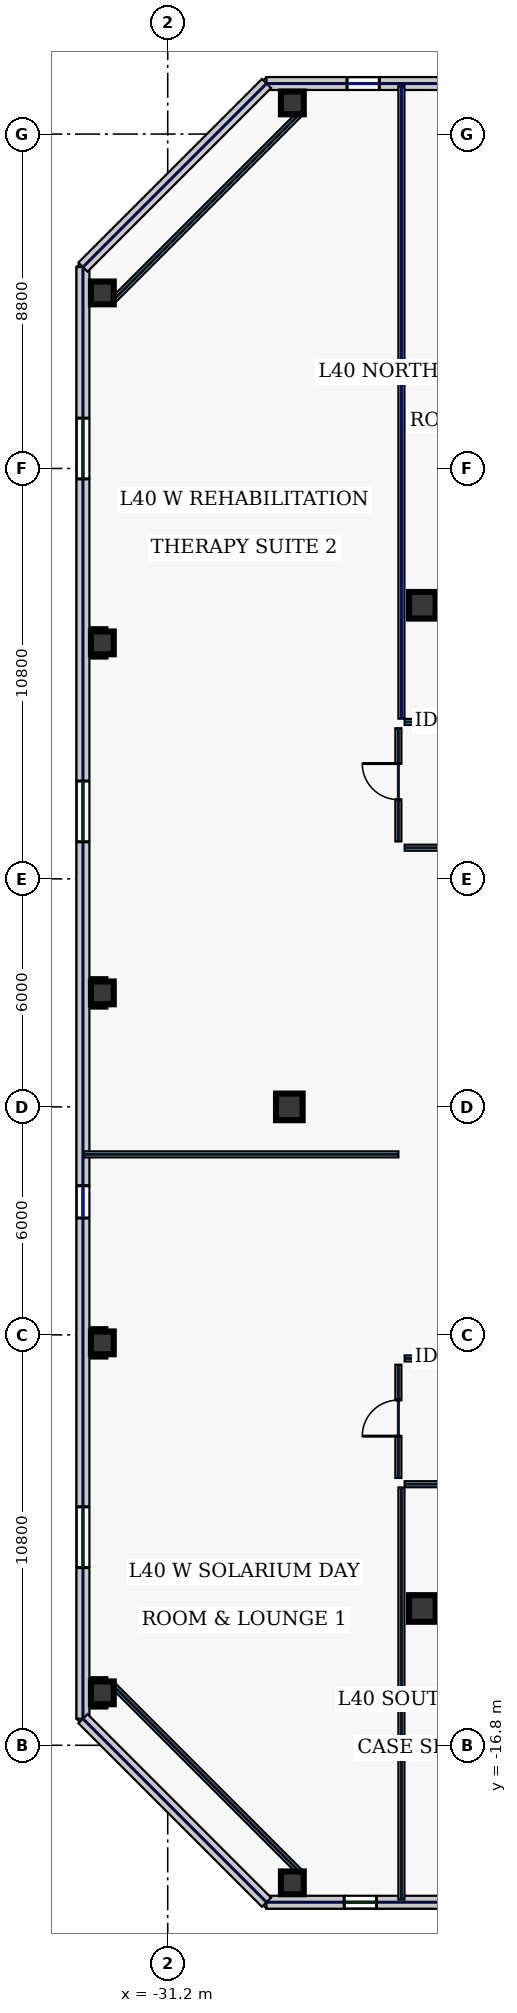
"""IFC4 building model, lengths in metres.
Left out: names, types, materials, properties, quantities, classifications, styles, units other than length and angle.
Written with IfcOpenShell. Run it as: python <this file> out.ifc"""

import sys

from ifc_helpers import new_model, si_unit, direction, frame, frame_2d, origin, origin_2d, place, context, subcontext, project, spatial, rectangle, hollow_rectangle, extrude, element, fill, save


model = new_model("IFC4")
c1 = context("Model", 3, precision=1e-05, world=origin(), true_north=direction((0.0, 1.0)))
c2 = subcontext(c1, "Body", "Model", "MODEL_VIEW")
j1 = project(units=[si_unit("LENGTHUNIT", "METRE"), si_unit("PLANEANGLEUNIT", "RADIAN")], contexts=[c1])
p1 = place(None, origin())
s1 = spatial("IfcSite", under=j1, at=p1, CompositionType="ELEMENT")
p2 = place(p1, origin())
s2 = spatial("IfcBuilding", under=s1, at=p2, CompositionType="ELEMENT")
p3 = place(p2, frame((0.0, 0.0, 176.2)))
s3 = spatial("IfcBuildingStorey", under=s2, at=p3, CompositionType="ELEMENT", Elevation=176.2)
for number, where, z_axis, x_axis in (
    (1, (-24.5, -13.2, 0.0), (0.0, 0.0, 1.0), (1.0, 0.0, 0.0)),
    (2, (-24.5, 13.2, 0.0), (0.0, 0.0, 1.0), (1.0, 0.0, 0.0)),
    (3, (-28.0, 0.0, 0.0), (0.0, 0.0, 1.0), (1.0, 0.0, 0.0)),
):
    element("IfcColumn", number, at=place(p3, frame(where, z_axis=z_axis, x_axis=x_axis)), inside=s3, PredefinedType="COLUMN", context=c2, shape_type="SweptSolid", body=[
        extrude(hollow_rectangle(XDim=0.7, YDim=0.7, WallThickness=0.032, at=origin_2d()), origin(), (0.0, 0.0, 1.0), 3.74),
    ])
for number, where, z_axis, x_axis in (
    (4, (-27.92, -20.42, 0.0), (0.0, 0.0, 1.0), (1.0, 0.0, 0.0)),
    (5, (-27.92, 26.42, 0.0), (0.0, 0.0, 1.0), (1.0, 0.0, 0.0)),
    (6, (-32.92, 21.42, 0.0), (0.0, 0.0, 1.0), (1.0, 0.0, 0.0)),
    (7, (-32.92, 12.21, 0.0), (0.0, 0.0, 1.0), (1.0, 0.0, 0.0)),
    (8, (-32.92, 3.0, 0.0), (0.0, 0.0, 1.0), (1.0, 0.0, 0.0)),
    (9, (-32.92, -6.21, 0.0), (0.0, 0.0, 1.0), (1.0, 0.0, 0.0)),
    (10, (-32.92, -15.42, 0.0), (0.0, 0.0, 1.0), (1.0, 0.0, 0.0)),
):
    element("IfcColumn", number, at=place(p3, frame(where, z_axis=z_axis, x_axis=x_axis)), inside=s3, PredefinedType="COLUMN", context=c2, shape_type="SweptSolid", body=[
        extrude(hollow_rectangle(XDim=0.6, YDim=0.6, WallThickness=0.028, at=origin_2d()), origin(), (0.0, 0.0, 1.0), 3.74),
    ])
p4 = place(p3, frame((-28.6, -20.93, 0.0), z_axis=(0.0, 0.0, 1.0), x_axis=(1.0, 0.0, 0.0)))
e11 = element("IfcWall", 11, at=p4, inside=s3, PredefinedType="STANDARD", context=c2, shape_type="SweptSolid", body=[
    extrude(rectangle(XDim=19.937, YDim=0.34, at=frame_2d((9.969, 0.0))), origin(), (0.0, 0.0, 1.0), 3.74),
])
p5 = place(p4, frame((2.044, 0.0, 0.8)))
e12 = element("IfcOpeningElement", 12, at=p5, cuts=e11, PredefinedType="OPENING", context=c2, shape_type="SweptSolid", body=[
    extrude(rectangle(XDim=0.85, YDim=1.85, at=frame_2d((0.425, 0.925))), frame((0.0, 0.18, 0.0), z_axis=(0.0, -1.0, 0.0), x_axis=(1.0, 0.0, 0.0)), (0.0, 0.0, 1.0), 0.36),
])
p6 = place(p4, frame((6.029, 0.0, 0.8)))
e13 = element("IfcOpeningElement", 13, at=p6, cuts=e11, PredefinedType="OPENING", context=c2, shape_type="SweptSolid", body=[
    extrude(rectangle(XDim=0.85, YDim=1.85, at=frame_2d((0.425, 0.925))), frame((0.0, 0.18, 0.0), z_axis=(0.0, -1.0, 0.0), x_axis=(1.0, 0.0, 0.0)), (0.0, 0.0, 1.0), 0.36),
])
p7 = place(p4, frame((10.707, 0.0, 0.8)))
e14 = element("IfcOpeningElement", 14, at=p7, cuts=e11, PredefinedType="OPENING", context=c2, shape_type="SweptSolid", body=[
    extrude(rectangle(XDim=1.95, YDim=2.1, at=frame_2d((0.975, 1.05))), frame((0.0, 0.18, 0.0), z_axis=(0.0, -1.0, 0.0), x_axis=(1.0, 0.0, 0.0)), (0.0, 0.0, 1.0), 0.36),
])
p8 = place(p4, frame((14.692, 0.0, 0.8)))
e15 = element("IfcOpeningElement", 15, at=p8, cuts=e11, PredefinedType="OPENING", context=c2, shape_type="SweptSolid", body=[
    extrude(rectangle(XDim=1.95, YDim=2.1, at=frame_2d((0.975, 1.05))), frame((0.0, 0.18, 0.0), z_axis=(0.0, -1.0, 0.0), x_axis=(1.0, 0.0, 0.0)), (0.0, 0.0, 1.0), 0.36),
])
p9 = place(p3, frame((-8.663, 26.93, 0.0), z_axis=(0.0, 0.0, 1.0), x_axis=(-1.0, 0.0, 0.0)))
e16 = element("IfcWall", 16, at=p9, inside=s3, PredefinedType="STANDARD", context=c2, shape_type="SweptSolid", body=[
    extrude(rectangle(XDim=19.937, YDim=0.34, at=frame_2d((9.969, 0.0))), origin(), (0.0, 0.0, 1.0), 3.74),
])
p10 = place(p9, frame((16.968, 0.0, 0.7)))
e17 = element("IfcOpeningElement", 17, at=p10, cuts=e16, PredefinedType="OPENING", context=c2, shape_type="SweptSolid", body=[
    extrude(rectangle(XDim=0.85, YDim=1.85, at=frame_2d((0.425, 0.925))), frame((0.0, 0.18, 0.0), z_axis=(0.0, -1.0, 0.0), x_axis=(1.0, 0.0, 0.0)), (0.0, 0.0, 1.0), 0.36),
])
p11 = place(p9, frame((12.033, 0.0, 0.7)))
e18 = element("IfcOpeningElement", 18, at=p11, cuts=e16, PredefinedType="OPENING", context=c2, shape_type="SweptSolid", body=[
    extrude(rectangle(XDim=1.8, YDim=2.2, at=frame_2d((0.9, 1.1))), frame((0.0, 0.18, 0.0), z_axis=(0.0, -1.0, 0.0), x_axis=(1.0, 0.0, 0.0)), (0.0, 0.0, 1.0), 0.36),
])
p12 = place(p9, frame((7.355, 0.0, 0.7)))
e19 = element("IfcOpeningElement", 19, at=p12, cuts=e16, PredefinedType="OPENING", context=c2, shape_type="SweptSolid", body=[
    extrude(rectangle(XDim=1.8, YDim=2.2, at=frame_2d((0.9, 1.1))), frame((0.0, 0.18, 0.0), z_axis=(0.0, -1.0, 0.0), x_axis=(1.0, 0.0, 0.0)), (0.0, 0.0, 1.0), 0.36),
])
p13 = place(p9, frame((3.371, 0.0, 0.7)))
e20 = element("IfcOpeningElement", 20, at=p13, cuts=e16, PredefinedType="OPENING", context=c2, shape_type="SweptSolid", body=[
    extrude(rectangle(XDim=0.85, YDim=1.85, at=frame_2d((0.425, 0.925))), frame((0.0, 0.18, 0.0), z_axis=(0.0, -1.0, 0.0), x_axis=(1.0, 0.0, 0.0)), (0.0, 0.0, 1.0), 0.36),
])
p14 = place(p3, frame((-33.43, 22.1, 0.0), z_axis=(0.0, 0.0, 1.0), x_axis=(0.0, -1.0, 0.0)))
e21 = element("IfcWall", 21, at=p14, inside=s3, PredefinedType="STANDARD", context=c2, shape_type="SweptSolid", body=[
    extrude(rectangle(XDim=38.2, YDim=0.34, at=frame_2d((19.1, 0.0))), origin(), (0.0, 0.0, 1.0), 3.74),
])
p15 = place(p14, frame((3.975, 0.0, 0.58)))
e22 = element("IfcOpeningElement", 22, at=p15, cuts=e21, PredefinedType="OPENING", context=c2, shape_type="SweptSolid", body=[
    extrude(rectangle(XDim=1.6, YDim=2.3, at=frame_2d((0.8, 1.15))), frame((0.0, 0.18, 0.0), z_axis=(0.0, -1.0, 0.0), x_axis=(1.0, 0.0, 0.0)), (0.0, 0.0, 1.0), 0.36),
])
p16 = place(p14, frame((13.525, 0.0, 0.58)))
e23 = element("IfcOpeningElement", 23, at=p16, cuts=e21, PredefinedType="OPENING", context=c2, shape_type="SweptSolid", body=[
    extrude(rectangle(XDim=1.6, YDim=2.3, at=frame_2d((0.8, 1.15))), frame((0.0, 0.18, 0.0), z_axis=(0.0, -1.0, 0.0), x_axis=(1.0, 0.0, 0.0)), (0.0, 0.0, 1.0), 0.36),
])
p17 = place(p14, frame((24.175, 0.0, 0.75)))
e24 = element("IfcOpeningElement", 24, at=p17, cuts=e21, PredefinedType="OPENING", context=c2, shape_type="SweptSolid", body=[
    extrude(rectangle(XDim=0.85, YDim=1.85, at=frame_2d((0.425, 0.925))), frame((0.0, 0.18, 0.0), z_axis=(0.0, -1.0, 0.0), x_axis=(1.0, 0.0, 0.0)), (0.0, 0.0, 1.0), 0.36),
])
p18 = place(p14, frame((32.625, 0.0, 0.58)))
e25 = element("IfcOpeningElement", 25, at=p18, cuts=e21, PredefinedType="OPENING", context=c2, shape_type="SweptSolid", body=[
    extrude(rectangle(XDim=1.6, YDim=2.3, at=frame_2d((0.8, 1.15))), frame((0.0, 0.18, 0.0), z_axis=(0.0, -1.0, 0.0), x_axis=(1.0, 0.0, 0.0)), (0.0, 0.0, 1.0), 0.36),
])
for number, where, z_axis, x_axis in (
    (26, (-28.6, 26.93, 0.0), (0.0, 0.0, 1.0), (-0.707, -0.707, 0.0)),
    (27, (-33.43, -16.1, 0.0), (0.0, 0.0, 1.0), (0.707, -0.707, 0.0)),
):
    element("IfcWall", number, at=place(p3, frame(where, z_axis=z_axis, x_axis=x_axis)), inside=s3, PredefinedType="STANDARD", context=c2, shape_type="SweptSolid", body=[
        extrude(rectangle(XDim=6.83, YDim=0.34, at=frame_2d((3.415, 0.0))), origin(), (0.0, 0.0, 1.0), 3.74),
    ])
for number, where, z_axis, x_axis in (
    (28, (-27.68, 26.18, 0.0), (0.0, 0.0, 1.0), (-0.707, -0.707, 0.0)),
    (29, (-32.68, -15.18, 0.0), (0.0, 0.0, 1.0), (0.707, -0.707, 0.0)),
):
    element("IfcWall", number, at=place(p3, frame(where, z_axis=z_axis, x_axis=x_axis)), inside=s3, PredefinedType="PARTITIONING", context=c2, shape_type="SweptSolid", body=[
        extrude(rectangle(XDim=7.071, YDim=0.16, at=frame_2d((3.536, 0.0))), origin(), (0.0, 0.0, 1.0), 3.74),
    ])
p19 = place(p3, frame((-25.13, -9.765, 0.0), z_axis=(0.0, 0.0, 1.0), x_axis=(0.0, 1.0, 0.0)))
e30 = element("IfcWall", 30, at=p19, inside=s3, PredefinedType="PARTITIONING", context=c2, shape_type="SweptSolid", body=[
    extrude(rectangle(XDim=2.98, YDim=0.16, at=frame_2d((1.49, 0.0))), origin(), (0.0, 0.0, 1.0), 3.74),
])
p20 = place(p19, frame((1.1, 0.0, 0.0)))
e31 = element("IfcOpeningElement", 31, at=p20, cuts=e30, PredefinedType="OPENING", context=c2, shape_type="SweptSolid", body=[
    extrude(rectangle(XDim=0.95, YDim=2.2, at=frame_2d((0.475, 1.1))), frame((0.0, 0.09, 0.0), z_axis=(0.0, -1.0, 0.0), x_axis=(1.0, 0.0, 0.0)), (0.0, 0.0, 1.0), 0.18),
])
for number, where, z_axis, x_axis in (
    (32, (-24.965, -6.62, 0.0), (0.0, 0.0, 1.0), (1.0, 0.0, 0.0)),
    (33, (-10.63, 6.82, 0.0), (0.0, 0.0, 1.0), (-1.0, 0.0, 0.0)),
):
    element("IfcWall", number, at=place(p3, frame(where, z_axis=z_axis, x_axis=x_axis)), inside=s3, PredefinedType="PARTITIONING", context=c2, shape_type="SweptSolid", body=[
        extrude(rectangle(XDim=14.335, YDim=0.16, at=frame_2d((7.167, 0.0))), origin(), (0.0, 0.0, 1.0), 3.74),
    ])
p21 = place(p3, frame((-25.13, 6.985, 0.0), z_axis=(0.0, 0.0, 1.0), x_axis=(0.0, 1.0, 0.0)))
e34 = element("IfcWall", 34, at=p21, inside=s3, PredefinedType="PARTITIONING", context=c2, shape_type="SweptSolid", body=[
    extrude(rectangle(XDim=2.98, YDim=0.16, at=frame_2d((1.49, 0.0))), origin(), (0.0, 0.0, 1.0), 3.74),
])
p22 = place(p21, frame((1.1, 0.0, 0.0)))
e35 = element("IfcOpeningElement", 35, at=p22, cuts=e34, PredefinedType="OPENING", context=c2, shape_type="SweptSolid", body=[
    extrude(rectangle(XDim=0.95, YDim=2.2, at=frame_2d((0.475, 1.1))), frame((0.0, 0.09, 0.0), z_axis=(0.0, -1.0, 0.0), x_axis=(1.0, 0.0, 0.0)), (0.0, 0.0, 1.0), 0.18),
])
p23 = place(p3, frame((-24.965, 10.13, 0.0), z_axis=(0.0, 0.0, 1.0), x_axis=(1.0, 0.0, 0.0)))
e36 = element("IfcWall", 36, at=p23, inside=s3, PredefinedType="PARTITIONING", context=c2, shape_type="SweptSolid", body=[
    extrude(rectangle(XDim=49.93, YDim=0.16, at=frame_2d((24.965, 0.0))), origin(), (0.0, 0.0, 1.0), 3.74),
])
p24 = place(p23, frame((2.667, 0.0, 0.0)))
e37 = element("IfcOpeningElement", 37, at=p24, cuts=e36, PredefinedType="OPENING", context=c2, shape_type="SweptSolid", body=[
    extrude(rectangle(XDim=0.95, YDim=2.2, at=frame_2d((0.475, 1.1))), frame((0.0, 0.09, 0.0), z_axis=(0.0, -1.0, 0.0), x_axis=(1.0, 0.0, 0.0)), (0.0, 0.0, 1.0), 0.18),
])
p25 = place(p23, frame((7.917, 0.0, 0.0)))
e38 = element("IfcOpeningElement", 38, at=p25, cuts=e36, PredefinedType="OPENING", context=c2, shape_type="SweptSolid", body=[
    extrude(rectangle(XDim=0.95, YDim=2.2, at=frame_2d((0.475, 1.1))), frame((0.0, 0.09, 0.0), z_axis=(0.0, -1.0, 0.0), x_axis=(1.0, 0.0, 0.0)), (0.0, 0.0, 1.0), 0.18),
])
p26 = place(p23, frame((14.73, 0.0, 0.0)))
e39 = element("IfcOpeningElement", 39, at=p26, cuts=e36, PredefinedType="OPENING", context=c2, shape_type="SweptSolid", body=[
    extrude(rectangle(XDim=0.95, YDim=2.2, at=frame_2d((0.475, 1.1))), frame((0.0, 0.09, 0.0), z_axis=(0.0, -1.0, 0.0), x_axis=(1.0, 0.0, 0.0)), (0.0, 0.0, 1.0), 0.18),
])
p27 = place(p23, frame((22.91, 0.0, 0.0)))
e40 = element("IfcOpeningElement", 40, at=p27, cuts=e36, PredefinedType="OPENING", context=c2, shape_type="SweptSolid", body=[
    extrude(rectangle(XDim=0.95, YDim=2.2, at=frame_2d((0.475, 1.1))), frame((0.0, 0.09, 0.0), z_axis=(0.0, -1.0, 0.0), x_axis=(1.0, 0.0, 0.0)), (0.0, 0.0, 1.0), 0.18),
])
p28 = place(p23, frame((31.3, 0.0, 0.0)))
e41 = element("IfcOpeningElement", 41, at=p28, cuts=e36, PredefinedType="OPENING", context=c2, shape_type="SweptSolid", body=[
    extrude(rectangle(XDim=1.05, YDim=2.2, at=frame_2d((0.525, 1.1))), frame((0.0, 0.09, 0.0), z_axis=(0.0, -1.0, 0.0), x_axis=(1.0, 0.0, 0.0)), (0.0, 0.0, 1.0), 0.18),
])
p29 = place(p23, frame((39.9, 0.0, 0.0)))
e42 = element("IfcOpeningElement", 42, at=p29, cuts=e36, PredefinedType="OPENING", context=c2, shape_type="SweptSolid", body=[
    extrude(rectangle(XDim=1.15, YDim=2.2, at=frame_2d((0.575, 1.1))), frame((0.0, 0.09, 0.0), z_axis=(0.0, -1.0, 0.0), x_axis=(1.0, 0.0, 0.0)), (0.0, 0.0, 1.0), 0.18),
])
p30 = place(p23, frame((46.606, 0.0, 0.0)))
e43 = element("IfcOpeningElement", 43, at=p30, cuts=e36, PredefinedType="OPENING", context=c2, shape_type="SweptSolid", body=[
    extrude(rectangle(XDim=0.95, YDim=2.2, at=frame_2d((0.475, 1.1))), frame((0.0, 0.09, 0.0), z_axis=(0.0, -1.0, 0.0), x_axis=(1.0, 0.0, 0.0)), (0.0, 0.0, 1.0), 0.18),
])
p31 = place(p3, frame((24.965, -9.93, 0.0), z_axis=(0.0, 0.0, 1.0), x_axis=(-1.0, 0.0, 0.0)))
e44 = element("IfcWall", 44, at=p31, inside=s3, PredefinedType="PARTITIONING", context=c2, shape_type="SweptSolid", body=[
    extrude(rectangle(XDim=49.93, YDim=0.16, at=frame_2d((24.965, 0.0))), origin(), (0.0, 0.0, 1.0), 3.74),
])
p32 = place(p31, frame((47.106, 0.0, 0.0)))
e45 = element("IfcOpeningElement", 45, at=p32, cuts=e44, PredefinedType="OPENING", context=c2, shape_type="SweptSolid", body=[
    extrude(rectangle(XDim=0.95, YDim=2.2, at=frame_2d((0.475, 1.1))), frame((0.0, 0.09, 0.0), z_axis=(0.0, -1.0, 0.0), x_axis=(1.0, 0.0, 0.0)), (0.0, 0.0, 1.0), 0.18),
])
p33 = place(p31, frame((39.975, 0.0, 0.0)))
e46 = element("IfcOpeningElement", 46, at=p33, cuts=e44, PredefinedType="OPENING", context=c2, shape_type="SweptSolid", body=[
    extrude(rectangle(XDim=0.95, YDim=2.2, at=frame_2d((0.475, 1.1))), frame((0.0, 0.09, 0.0), z_axis=(0.0, -1.0, 0.0), x_axis=(1.0, 0.0, 0.0)), (0.0, 0.0, 1.0), 0.18),
])
p34 = place(p31, frame((31.175, 0.0, 0.0)))
e47 = element("IfcOpeningElement", 47, at=p34, cuts=e44, PredefinedType="OPENING", context=c2, shape_type="SweptSolid", body=[
    extrude(rectangle(XDim=1.05, YDim=2.2, at=frame_2d((0.525, 1.1))), frame((0.0, 0.09, 0.0), z_axis=(0.0, -1.0, 0.0), x_axis=(1.0, 0.0, 0.0)), (0.0, 0.0, 1.0), 0.18),
])
p35 = place(p31, frame((23.375, 0.0, 0.0)))
e48 = element("IfcOpeningElement", 48, at=p35, cuts=e44, PredefinedType="OPENING", context=c2, shape_type="SweptSolid", body=[
    extrude(rectangle(XDim=0.95, YDim=2.2, at=frame_2d((0.475, 1.1))), frame((0.0, 0.09, 0.0), z_axis=(0.0, -1.0, 0.0), x_axis=(1.0, 0.0, 0.0)), (0.0, 0.0, 1.0), 0.18),
])
p36 = place(p31, frame((15.275, 0.0, 0.0)))
e49 = element("IfcOpeningElement", 49, at=p36, cuts=e44, PredefinedType="OPENING", context=c2, shape_type="SweptSolid", body=[
    extrude(rectangle(XDim=0.95, YDim=2.2, at=frame_2d((0.475, 1.1))), frame((0.0, 0.09, 0.0), z_axis=(0.0, -1.0, 0.0), x_axis=(1.0, 0.0, 0.0)), (0.0, 0.0, 1.0), 0.18),
])
p37 = place(p31, frame((7.675, 0.0, 0.0)))
e50 = element("IfcOpeningElement", 50, at=p37, cuts=e44, PredefinedType="OPENING", context=c2, shape_type="SweptSolid", body=[
    extrude(rectangle(XDim=1.15, YDim=2.2, at=frame_2d((0.575, 1.1))), frame((0.0, 0.09, 0.0), z_axis=(0.0, -1.0, 0.0), x_axis=(1.0, 0.0, 0.0)), (0.0, 0.0, 1.0), 0.18),
])
p38 = place(p31, frame((2.044, 0.0, 0.0)))
e51 = element("IfcOpeningElement", 51, at=p38, cuts=e44, PredefinedType="OPENING", context=c2, shape_type="SweptSolid", body=[
    extrude(rectangle(XDim=0.95, YDim=2.2, at=frame_2d((0.475, 1.1))), frame((0.0, 0.09, 0.0), z_axis=(0.0, -1.0, 0.0), x_axis=(1.0, 0.0, 0.0)), (0.0, 0.0, 1.0), 0.18),
])
p39 = place(p3, frame((-25.05, 10.215, 0.0), z_axis=(0.0, 0.0, 1.0), x_axis=(0.0, 1.0, 0.0)))
e52 = element("IfcWall", 52, at=p39, inside=s3, PredefinedType="PARTITIONING", context=c2, shape_type="SweptSolid", body=[
    extrude(rectangle(XDim=16.645, YDim=0.16, at=frame_2d((8.323, 0.0))), origin(), (0.0, 0.0, 1.0), 3.285),
])
p40 = place(p3, frame((-25.05, -20.86, 0.0), z_axis=(0.0, 0.0, 1.0), x_axis=(0.0, 1.0, 0.0)))
e53 = element("IfcWall", 53, at=p40, inside=s3, PredefinedType="PARTITIONING", context=c2, shape_type="SweptSolid", body=[
    extrude(rectangle(XDim=10.845, YDim=0.16, at=frame_2d((5.423, 0.0))), origin(), (0.0, 0.0, 1.0), 3.74),
])
p41 = place(p3, frame((-33.41, -1.25, 0.0), z_axis=(0.0, 0.0, 1.0), x_axis=(1.0, 0.0, 0.0)))
e54 = element("IfcWall", 54, at=p41, inside=s3, PredefinedType="PARTITIONING", context=c2, shape_type="SweptSolid", body=[
    extrude(rectangle(XDim=8.28, YDim=0.16, at=frame_2d((4.14, 0.0))), origin(), (0.0, 0.0, 1.0), 3.74),
])
p42 = place(p5, origin())
e55 = element("IfcWindow", 55, at=p42, inside=s3, PartitioningType="SINGLE_PANEL", PredefinedType="WINDOW", context=c2, shape_type="SweptSolid", body=[
    extrude(rectangle(XDim=0.85, YDim=1.85, at=frame_2d((0.425, 0.925))), frame((0.0, 0.03, 0.0), z_axis=(0.0, -1.0, 0.0), x_axis=(1.0, 0.0, 0.0)), (0.0, 0.0, 1.0), 0.06),
])
fill(e12, e55)
p43 = place(p10, origin())
e56 = element("IfcWindow", 56, at=p43, inside=s3, PartitioningType="SINGLE_PANEL", PredefinedType="WINDOW", context=c2, shape_type="SweptSolid", body=[
    extrude(rectangle(XDim=0.85, YDim=1.85, at=frame_2d((0.425, 0.925))), frame((0.0, 0.03, 0.0), z_axis=(0.0, -1.0, 0.0), x_axis=(1.0, 0.0, 0.0)), (0.0, 0.0, 1.0), 0.06),
])
fill(e17, e56)
p44 = place(p15, origin())
e57 = element("IfcWindow", 57, at=p44, inside=s3, PartitioningType="SINGLE_PANEL", PredefinedType="WINDOW", context=c2, shape_type="SweptSolid", body=[
    extrude(rectangle(XDim=1.6, YDim=2.3, at=frame_2d((0.8, 1.15))), frame((0.0, 0.03, 0.0), z_axis=(0.0, -1.0, 0.0), x_axis=(1.0, 0.0, 0.0)), (0.0, 0.0, 1.0), 0.06),
])
fill(e22, e57)
p45 = place(p16, origin())
e58 = element("IfcWindow", 58, at=p45, inside=s3, PartitioningType="SINGLE_PANEL", PredefinedType="WINDOW", context=c2, shape_type="SweptSolid", body=[
    extrude(rectangle(XDim=1.6, YDim=2.3, at=frame_2d((0.8, 1.15))), frame((0.0, 0.03, 0.0), z_axis=(0.0, -1.0, 0.0), x_axis=(1.0, 0.0, 0.0)), (0.0, 0.0, 1.0), 0.06),
])
fill(e23, e58)
p46 = place(p17, origin())
e59 = element("IfcWindow", 59, at=p46, inside=s3, PartitioningType="SINGLE_PANEL", PredefinedType="WINDOW", context=c2, shape_type="SweptSolid", body=[
    extrude(rectangle(XDim=0.85, YDim=1.85, at=frame_2d((0.425, 0.925))), frame((0.0, 0.03, 0.0), z_axis=(0.0, -1.0, 0.0), x_axis=(1.0, 0.0, 0.0)), (0.0, 0.0, 1.0), 0.06),
])
fill(e24, e59)
p47 = place(p18, origin())
e60 = element("IfcWindow", 60, at=p47, inside=s3, PartitioningType="SINGLE_PANEL", PredefinedType="WINDOW", context=c2, shape_type="SweptSolid", body=[
    extrude(rectangle(XDim=1.6, YDim=2.3, at=frame_2d((0.8, 1.15))), frame((0.0, 0.03, 0.0), z_axis=(0.0, -1.0, 0.0), x_axis=(1.0, 0.0, 0.0)), (0.0, 0.0, 1.0), 0.06),
])
fill(e25, e60)
p48 = place(p20, origin())
e61 = element("IfcDoor", 61, at=p48, inside=s3, OperationType="SINGLE_SWING_LEFT", PredefinedType="DOOR", context=c2, shape_type="SweptSolid", body=[
    extrude(rectangle(XDim=0.95, YDim=2.2, at=frame_2d((0.475, 1.1))), frame((0.0, 0.025, 0.0), z_axis=(0.0, -1.0, 0.0), x_axis=(1.0, 0.0, 0.0)), (0.0, 0.0, 1.0), 0.05),
])
fill(e31, e61)
p49 = place(p22, origin())
e62 = element("IfcDoor", 62, at=p49, inside=s3, OperationType="SINGLE_SWING_RIGHT", PredefinedType="DOOR", context=c2, shape_type="SweptSolid", body=[
    extrude(rectangle(XDim=0.95, YDim=2.2, at=frame_2d((0.475, 1.1))), frame((0.0, 0.025, 0.0), z_axis=(0.0, -1.0, 0.0), x_axis=(1.0, 0.0, 0.0)), (0.0, 0.0, 1.0), 0.05),
])
fill(e35, e62)
save(model, sys.argv[1])
